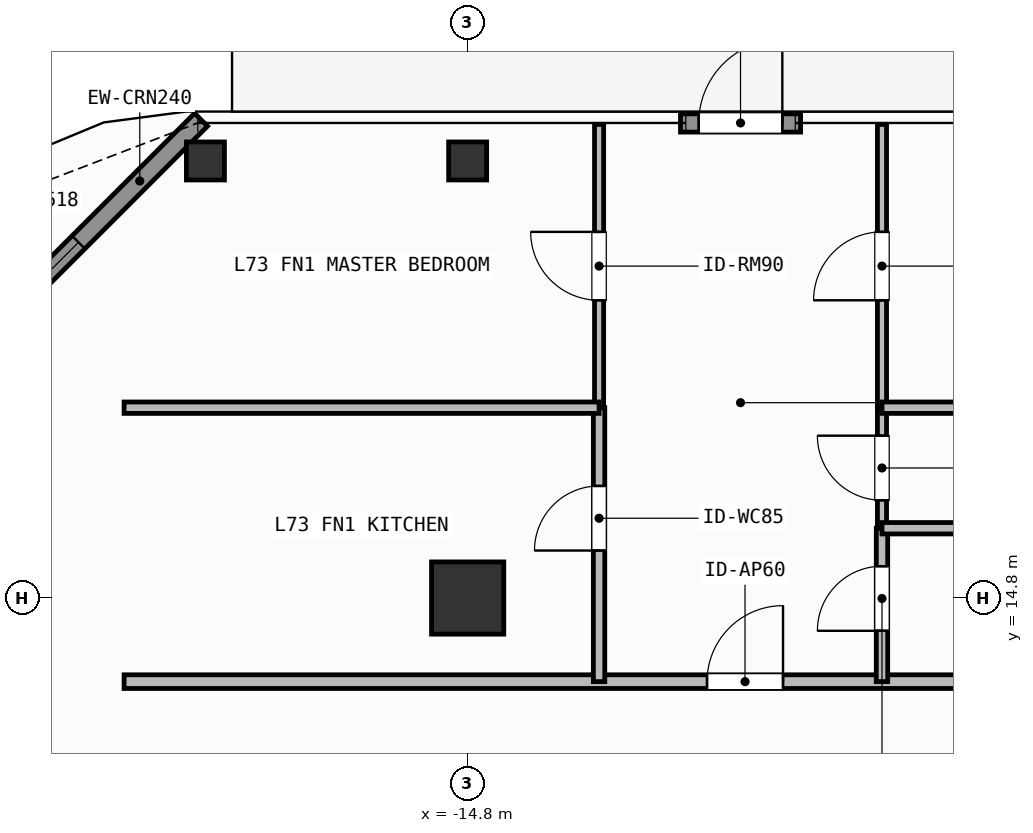
"""IFC4 building model, lengths in metres.
Left out: names, types, materials, properties, quantities, classifications, styles, units other than length and angle.
Written with IfcOpenShell. Run it as: python <this file> out.ifc"""

import sys

from ifc_helpers import new_model, si_unit, direction, frame, frame_2d, origin, origin_2d, place, context, subcontext, project, spatial, rectangle, hollow_rectangle, extrude, element, fill, save


model = new_model("IFC4")
c1 = context("Model", 3, precision=1e-05, world=origin(), true_north=direction((0.0, 1.0)))
c2 = subcontext(c1, "Body", "Model", "MODEL_VIEW")
j1 = project(units=[si_unit("LENGTHUNIT", "METRE"), si_unit("PLANEANGLEUNIT", "RADIAN")], contexts=[c1])
p1 = place(None, origin())
s1 = spatial("IfcSite", under=j1, at=p1, CompositionType="ELEMENT")
p2 = place(p1, origin())
s2 = spatial("IfcBuilding", under=s1, at=p2, CompositionType="ELEMENT")
p3 = place(p2, frame((0.0, 0.0, 297.6)))
s3 = spatial("IfcBuildingStorey", under=s2, at=p3, CompositionType="ELEMENT", Elevation=297.6)
p4 = place(p3, frame((-14.8, 14.8, 0.0), z_axis=(0.0, 0.0, 1.0), x_axis=(1.0, 0.0, 0.0)))
e1 = element("IfcColumn", 1, at=p4, inside=s3, PredefinedType="COLUMN", context=c2, shape_type="SweptSolid", body=[
    extrude(rectangle(XDim=0.95, YDim=0.95, at=origin_2d()), origin(), (0.0, 0.0, 1.0), 3.9),
])
for number, where, z_axis, x_axis in (
    (2, (-18.25, 20.55, 0.0), (0.0, 0.0, 1.0), (1.0, 0.0, 0.0)),
    (3, (-14.8, 20.55, 0.0), (0.0, 0.0, 1.0), (1.0, 0.0, 0.0)),
):
    element("IfcColumn", number, at=place(p3, frame(where, z_axis=z_axis, x_axis=x_axis)), inside=s3, PredefinedType="COLUMN", context=c2, shape_type="SweptSolid", body=[
        extrude(hollow_rectangle(XDim=0.5, YDim=0.5, WallThickness=0.025, at=origin_2d()), origin(), (0.0, 0.0, 1.0), 3.9),
    ])
p5 = place(p3, frame((-12.0, 21.05, 0.0), z_axis=(0.0, 0.0, 1.0), x_axis=(1.0, 0.0, 0.0)))
e4 = element("IfcWall", 4, at=p5, inside=s3, PredefinedType="SOLIDWALL", context=c2, shape_type="SweptSolid", body=[
    extrude(rectangle(XDim=1.58, YDim=0.24, at=frame_2d((0.79, 0.0))), origin(), (0.0, 0.0, 1.0), 3.68),
])
p6 = place(p5, frame((0.24, 0.0, 0.0)))
e5 = element("IfcOpeningElement", 5, at=p6, cuts=e4, PredefinedType="OPENING", context=c2, shape_type="SweptSolid", body=[
    extrude(rectangle(XDim=1.1, YDim=2.2, at=frame_2d((0.55, 1.1))), frame((0.0, 0.13, 0.0), z_axis=(0.0, -1.0, 0.0), x_axis=(1.0, 0.0, 0.0)), (0.0, 0.0, 1.0), 0.26),
])
p7 = place(p3, frame((-22.592, 16.808, 0.0), z_axis=(0.0, 0.0, 1.0), x_axis=(0.707106781187, 0.707106781187, 0.0)))
e6 = element("IfcWall", 6, at=p7, inside=s3, PredefinedType="SOLIDWALL", context=c2, shape_type="SweptSolid", body=[
    extrude(rectangle(XDim=6.059, YDim=0.24, at=frame_2d((3.03, 0.0))), origin(), (0.0, 0.0, 1.0), 3.68),
])
p8 = place(p7, frame((2.28, 0.0, 0.8)))
e7 = element("IfcOpeningElement", 7, at=p8, cuts=e6, PredefinedType="OPENING", context=c2, shape_type="SweptSolid", body=[
    extrude(rectangle(XDim=1.5, YDim=1.85, at=frame_2d((0.75, 0.925))), frame((0.0, 0.13, 0.0), z_axis=(0.0, -1.0, 0.0), x_axis=(1.0, 0.0, 0.0)), (0.0, 0.0, 1.0), 0.26),
])
p9 = place(p3, frame((-19.32, 13.7, 0.0), z_axis=(0.0, 0.0, 1.0), x_axis=(1.0, 0.0, 0.0)))
e8 = element("IfcWall", 8, at=p9, inside=s3, PredefinedType="PARTITIONING", context=c2, shape_type="SweptSolid", body=[
    extrude(rectangle(XDim=15.623, YDim=0.18, at=frame_2d((7.812, 0.0))), origin(), (0.0, 0.0, 1.0), 3.68),
])
p10 = place(p9, frame((7.669, 0.0, 0.0)))
e9 = element("IfcOpeningElement", 9, at=p10, cuts=e8, PredefinedType="OPENING", context=c2, shape_type="SweptSolid", body=[
    extrude(rectangle(XDim=1.0, YDim=2.2, at=frame_2d((0.5, 1.1))), frame((0.0, 0.1, 0.0), z_axis=(0.0, -1.0, 0.0), x_axis=(1.0, 0.0, 0.0)), (0.0, 0.0, 1.0), 0.2),
])
p11 = place(p3, frame((-13.071, 13.7, 0.0), z_axis=(0.0, 0.0, 1.0), x_axis=(0.0, 1.0, 0.0)))
e10 = element("IfcWall", 10, at=p11, inside=s3, PredefinedType="PARTITIONING", context=c2, shape_type="SweptSolid", body=[
    extrude(rectangle(XDim=3.604, YDim=0.15, at=frame_2d((1.802, 0.0))), origin(), (0.0, 0.0, 1.0), 3.68),
])
p12 = place(p11, frame((1.725, 0.0, 0.0)))
e11 = element("IfcOpeningElement", 11, at=p12, cuts=e10, PredefinedType="OPENING", context=c2, shape_type="SweptSolid", body=[
    extrude(rectangle(XDim=0.85, YDim=2.1, at=frame_2d((0.425, 1.05))), frame((0.0, 0.085, 0.0), z_axis=(0.0, -1.0, 0.0), x_axis=(1.0, 0.0, 0.0)), (0.0, 0.0, 1.0), 0.17),
])
p13 = place(p3, frame((-13.071, 17.304, 0.0), z_axis=(0.0, 0.0, 1.0), x_axis=(0.0, 1.0, 0.0)))
e12 = element("IfcWall", 12, at=p13, inside=s3, PredefinedType="PARTITIONING", context=c2, shape_type="SweptSolid", body=[
    extrude(rectangle(XDim=3.726, YDim=0.12, at=frame_2d((1.863, 0.0))), origin(), (0.0, 0.0, 1.0), 3.68),
])
p14 = place(p13, frame((1.413, 0.0, 0.0)))
e13 = element("IfcOpeningElement", 13, at=p14, cuts=e12, PredefinedType="OPENING", context=c2, shape_type="SweptSolid", body=[
    extrude(rectangle(XDim=0.9, YDim=2.1, at=frame_2d((0.45, 1.05))), frame((0.0, 0.07, 0.0), z_axis=(0.0, -1.0, 0.0), x_axis=(1.0, 0.0, 0.0)), (0.0, 0.0, 1.0), 0.14),
])
p15 = place(p3, frame((-9.349, 13.7, 0.0), z_axis=(0.0, 0.0, 1.0), x_axis=(0.0, 1.0, 0.0)))
e14 = element("IfcWall", 14, at=p15, inside=s3, PredefinedType="PARTITIONING", context=c2, shape_type="SweptSolid", body=[
    extrude(rectangle(XDim=2.018, YDim=0.15, at=frame_2d((1.009, 0.0))), origin(), (0.0, 0.0, 1.0), 3.68),
])
p16 = place(p15, frame((0.669, 0.0, 0.0)))
e15 = element("IfcOpeningElement", 15, at=p16, cuts=e14, PredefinedType="OPENING", context=c2, shape_type="SweptSolid", body=[
    extrude(rectangle(XDim=0.85, YDim=2.1, at=frame_2d((0.425, 1.05))), frame((0.0, 0.085, 0.0), z_axis=(0.0, -1.0, 0.0), x_axis=(1.0, 0.0, 0.0)), (0.0, 0.0, 1.0), 0.17),
])
p17 = place(p3, frame((-9.349, 15.718, 0.0), z_axis=(0.0, 0.0, 1.0), x_axis=(0.0, 1.0, 0.0)))
e16 = element("IfcWall", 16, at=p17, inside=s3, PredefinedType="PARTITIONING", context=c2, shape_type="SweptSolid", body=[
    extrude(rectangle(XDim=1.586, YDim=0.12, at=frame_2d((0.793, 0.0))), origin(), (0.0, 0.0, 1.0), 3.68),
])
p18 = place(p17, frame((0.368, 0.0, 0.0)))
e17 = element("IfcOpeningElement", 17, at=p18, cuts=e16, PredefinedType="OPENING", context=c2, shape_type="SweptSolid", body=[
    extrude(rectangle(XDim=0.85, YDim=2.1, at=frame_2d((0.425, 1.05))), frame((0.0, 0.07, 0.0), z_axis=(0.0, -1.0, 0.0), x_axis=(1.0, 0.0, 0.0)), (0.0, 0.0, 1.0), 0.14),
])
p19 = place(p3, frame((-9.349, 17.304, 0.0), z_axis=(0.0, 0.0, 1.0), x_axis=(0.0, 1.0, 0.0)))
e18 = element("IfcWall", 18, at=p19, inside=s3, PredefinedType="PARTITIONING", context=c2, shape_type="SweptSolid", body=[
    extrude(rectangle(XDim=3.726, YDim=0.12, at=frame_2d((1.863, 0.0))), origin(), (0.0, 0.0, 1.0), 3.68),
])
p20 = place(p19, frame((1.413, 0.0, 0.0)))
e19 = element("IfcOpeningElement", 19, at=p20, cuts=e18, PredefinedType="OPENING", context=c2, shape_type="SweptSolid", body=[
    extrude(rectangle(XDim=0.9, YDim=2.1, at=frame_2d((0.45, 1.05))), frame((0.0, 0.07, 0.0), z_axis=(0.0, -1.0, 0.0), x_axis=(1.0, 0.0, 0.0)), (0.0, 0.0, 1.0), 0.14),
])
p21 = place(p3, frame((-19.32, 17.304, 0.0), z_axis=(0.0, 0.0, 1.0), x_axis=(1.0, 0.0, 0.0)))
e20 = element("IfcWall", 20, at=p21, inside=s3, PredefinedType="PARTITIONING", context=c2, shape_type="SweptSolid", body=[
    extrude(rectangle(XDim=6.249, YDim=0.15, at=frame_2d((3.125, 0.0))), origin(), (0.0, 0.0, 1.0), 3.68),
])
for number, where, z_axis, x_axis in (
    (21, (-9.349, 15.718, 0.0), (0.0, 0.0, 1.0), (1.0, 0.0, 0.0)),
    (22, (-9.349, 17.304, 0.0), (0.0, 0.0, 1.0), (1.0, 0.0, 0.0)),
):
    element("IfcWall", number, at=place(p3, frame(where, z_axis=z_axis, x_axis=x_axis)), inside=s3, PredefinedType="PARTITIONING", context=c2, shape_type="SweptSolid", body=[
        extrude(rectangle(XDim=5.652, YDim=0.15, at=frame_2d((2.826, 0.0))), origin(), (0.0, 0.0, 1.0), 3.68),
    ])
p22 = place(p6, origin())
e23 = element("IfcDoor", 23, at=p22, inside=s3, OperationType="SINGLE_SWING_RIGHT", PredefinedType="DOOR", context=c2, shape_type="SweptSolid", body=[
    extrude(rectangle(XDim=1.1, YDim=2.2, at=frame_2d((0.55, 1.1))), frame((0.0, 0.025, 0.0), z_axis=(0.0, -1.0, 0.0), x_axis=(1.0, 0.0, 0.0)), (0.0, 0.0, 1.0), 0.05),
])
fill(e5, e23)
p23 = place(p8, origin())
e24 = element("IfcWindow", 24, at=p23, inside=s3, PartitioningType="SINGLE_PANEL", PredefinedType="WINDOW", context=c2, shape_type="SweptSolid", body=[
    extrude(rectangle(XDim=1.5, YDim=1.85, at=frame_2d((0.75, 0.925))), frame((0.0, 0.03, 0.0), z_axis=(0.0, -1.0, 0.0), x_axis=(1.0, 0.0, 0.0)), (0.0, 0.0, 1.0), 0.06),
])
fill(e7, e24)
p24 = place(p10, origin())
e25 = element("IfcDoor", 25, at=p24, inside=s3, OperationType="SINGLE_SWING_RIGHT", PredefinedType="DOOR", context=c2, shape_type="SweptSolid", body=[
    extrude(rectangle(XDim=1.0, YDim=2.2, at=frame_2d((0.5, 1.1))), frame((0.0, 0.025, 0.0), z_axis=(0.0, -1.0, 0.0), x_axis=(1.0, 0.0, 0.0)), (0.0, 0.0, 1.0), 0.05),
])
fill(e9, e25)
p25 = place(p12, origin())
e26 = element("IfcDoor", 26, at=p25, inside=s3, OperationType="SINGLE_SWING_LEFT", PredefinedType="DOOR", context=c2, shape_type="SweptSolid", body=[
    extrude(rectangle(XDim=0.85, YDim=2.1, at=frame_2d((0.425, 1.05))), frame((0.0, 0.025, 0.0), z_axis=(0.0, -1.0, 0.0), x_axis=(1.0, 0.0, 0.0)), (0.0, 0.0, 1.0), 0.05),
])
fill(e11, e26)
p26 = place(p14, origin())
e27 = element("IfcDoor", 27, at=p26, inside=s3, OperationType="SINGLE_SWING_RIGHT", PredefinedType="DOOR", context=c2, shape_type="SweptSolid", body=[
    extrude(rectangle(XDim=0.9, YDim=2.1, at=frame_2d((0.45, 1.05))), frame((0.0, 0.025, 0.0), z_axis=(0.0, -1.0, 0.0), x_axis=(1.0, 0.0, 0.0)), (0.0, 0.0, 1.0), 0.05),
])
fill(e13, e27)
p27 = place(p16, origin())
e28 = element("IfcDoor", 28, at=p27, inside=s3, OperationType="SINGLE_SWING_LEFT", PredefinedType="DOOR", context=c2, shape_type="SweptSolid", body=[
    extrude(rectangle(XDim=0.85, YDim=2.1, at=frame_2d((0.425, 1.05))), frame((0.0, 0.025, 0.0), z_axis=(0.0, -1.0, 0.0), x_axis=(1.0, 0.0, 0.0)), (0.0, 0.0, 1.0), 0.05),
])
fill(e15, e28)
p28 = place(p18, origin())
e29 = element("IfcDoor", 29, at=p28, inside=s3, OperationType="SINGLE_SWING_RIGHT", PredefinedType="DOOR", context=c2, shape_type="SweptSolid", body=[
    extrude(rectangle(XDim=0.85, YDim=2.1, at=frame_2d((0.425, 1.05))), frame((0.0, 0.025, 0.0), z_axis=(0.0, -1.0, 0.0), x_axis=(1.0, 0.0, 0.0)), (0.0, 0.0, 1.0), 0.05),
])
fill(e17, e29)
p29 = place(p20, origin())
e30 = element("IfcDoor", 30, at=p29, inside=s3, OperationType="SINGLE_SWING_LEFT", PredefinedType="DOOR", context=c2, shape_type="SweptSolid", body=[
    extrude(rectangle(XDim=0.9, YDim=2.1, at=frame_2d((0.45, 1.05))), frame((0.0, 0.025, 0.0), z_axis=(0.0, -1.0, 0.0), x_axis=(1.0, 0.0, 0.0)), (0.0, 0.0, 1.0), 0.05),
])
fill(e19, e30)
save(model, sys.argv[1])
